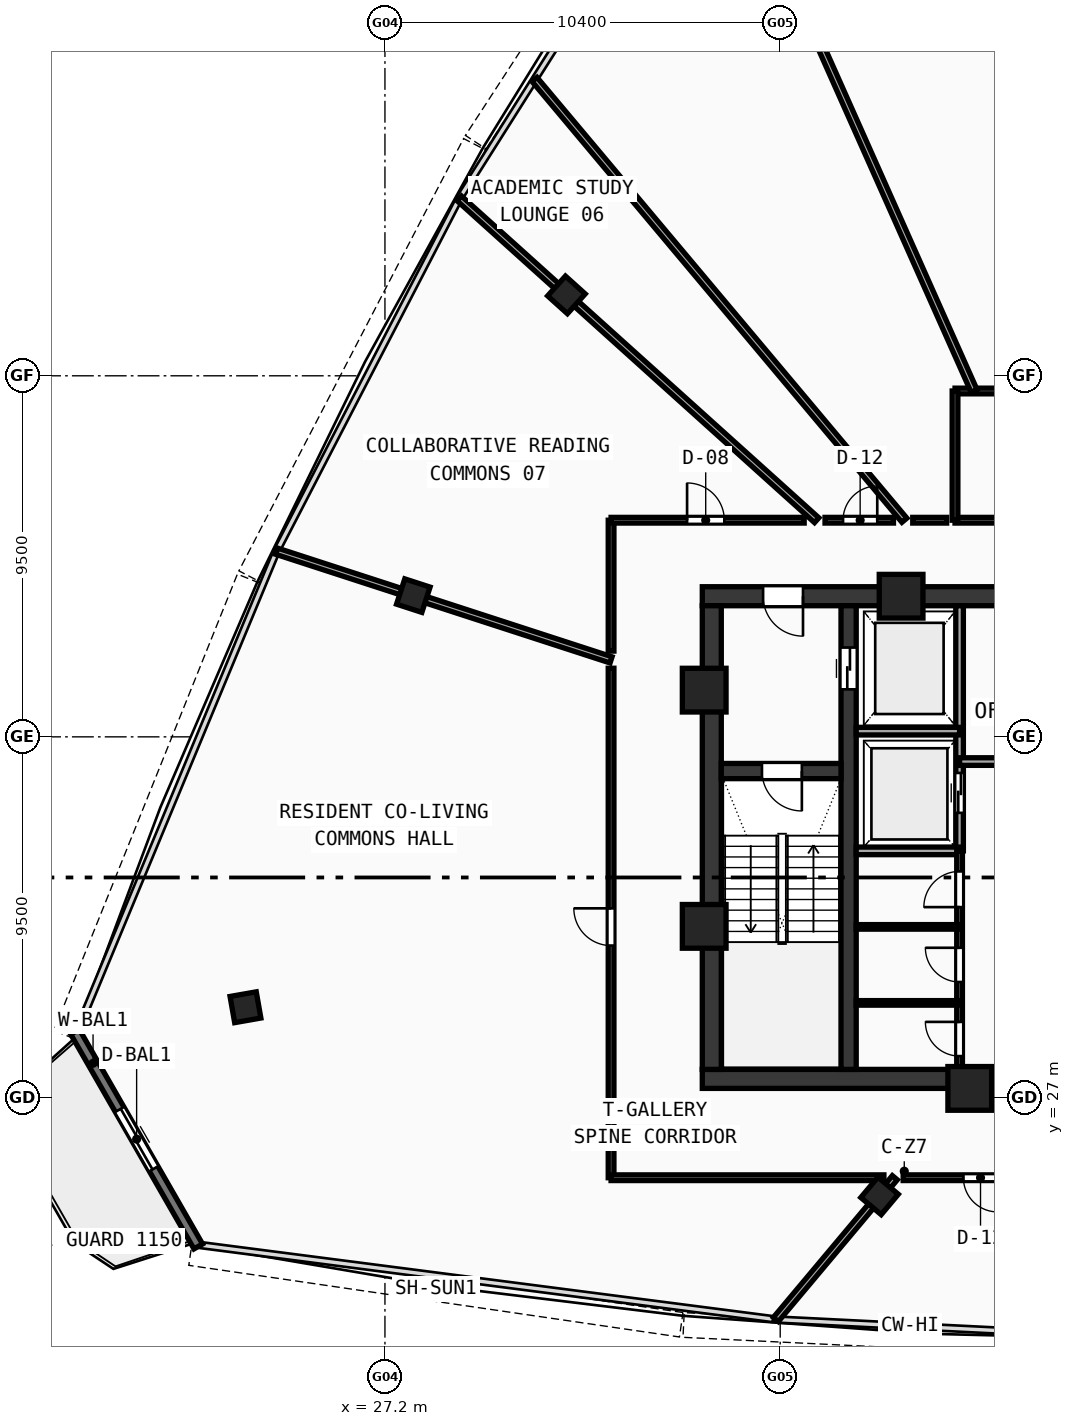
"""IFC4 building model, lengths in metres.
Left out: names, types, materials, properties, quantities, classifications, styles, units other than length and angle.
Written with IfcOpenShell. Run it as: python <this file> out.ifc"""

import sys

from ifc_helpers import new_model, si_unit, direction, frame, frame_2d, origin, origin_with_axes, origin_2d, place, context, subcontext, project, spatial, rectangle, hollow_rectangle, extrude, source, transform, mapped, element, fill, save


model = new_model("IFC4")
c1 = context("Model", 3, precision=1e-05, world=origin(), true_north=direction((0.0, 1.0)))
c2 = subcontext(c1, "Body", "Model", "MODEL_VIEW")
j1 = project(units=[si_unit("LENGTHUNIT", "METRE"), si_unit("PLANEANGLEUNIT", "RADIAN")], contexts=[c1])
p1 = place(None, origin())
s1 = spatial("IfcSite", under=j1, at=p1, CompositionType="ELEMENT")
p2 = place(p1, origin())
s2 = spatial("IfcBuilding", under=s1, at=p2, CompositionType="ELEMENT")
p3 = place(p2, frame((0.0, 0.0, 325.51)))
s3 = spatial("IfcBuildingStorey", under=s2, at=p3, CompositionType="ELEMENT", Elevation=325.51)
p4 = place(p3, frame((35.55, 27.5, 0.0), z_axis=(0.0, 0.0, 1.0), x_axis=(1.0, 0.0, 0.0)))
e1 = element("IfcWall", 1, at=p4, inside=s3, PredefinedType="SHEAR", context=c2, shape_type="SweptSolid", body=[
    extrude(rectangle(XDim=24.9, YDim=0.5, at=frame_2d((12.45, 0.0))), origin(), (0.0, 0.0, 1.0), 3.49),
])
p5 = place(p3, frame((35.55, 40.2, 0.0), z_axis=(0.0, 0.0, 1.0), x_axis=(1.0, 0.0, 0.0)))
e2 = element("IfcWall", 2, at=p5, inside=s3, PredefinedType="SHEAR", context=c2, shape_type="SweptSolid", body=[
    extrude(rectangle(XDim=11.25, YDim=0.5, at=frame_2d((5.625, 0.0))), origin(), (0.0, 0.0, 1.0), 3.49),
])
p6 = place(p5, frame((1.6, 0.0, 0.0)))
e3 = element("IfcOpeningElement", 3, at=p6, cuts=e2, PredefinedType="OPENING", context=c2, shape_type="SweptSolid", body=[
    extrude(rectangle(XDim=1.05, YDim=2.1, at=frame_2d((0.525, 1.05))), frame((0.0, 0.26, 0.0), z_axis=(0.0, -1.0, 0.0), x_axis=(1.0, 0.0, 0.0)), (0.0, 0.0, 1.0), 0.52),
])
p7 = place(p3, frame((35.8, 27.75, 0.0), z_axis=(0.0, 0.0, 1.0), x_axis=(0.0, 1.0, 0.0)))
e4 = element("IfcWall", 4, at=p7, inside=s3, PredefinedType="SHEAR", context=c2, shape_type="SweptSolid", body=[
    extrude(rectangle(XDim=12.2, YDim=0.5, at=frame_2d((6.1, 0.0))), origin(), (0.0, 0.0, 1.0), 3.49),
])
p8 = place(p3, frame((39.4, 27.75, 0.0), z_axis=(0.0, 0.0, 1.0), x_axis=(0.0, 1.0, 0.0)))
e5 = element("IfcWall", 5, at=p8, inside=s3, PredefinedType="SHEAR", context=c2, shape_type="SweptSolid", body=[
    extrude(rectangle(XDim=12.2, YDim=0.4, at=frame_2d((6.1, 0.0))), origin(), (0.0, 0.0, 1.0), 3.49),
])
p9 = place(p8, frame((10.0, 0.0, 0.0)))
e6 = element("IfcOpeningElement", 6, at=p9, cuts=e5, PredefinedType="OPENING", context=c2, shape_type="SweptSolid", body=[
    extrude(rectangle(XDim=1.1, YDim=2.1, at=frame_2d((0.55, 1.05))), frame((0.0, 0.21, 0.0), z_axis=(0.0, -1.0, 0.0), x_axis=(1.0, 0.0, 0.0)), (0.0, 0.0, 1.0), 0.42),
])
p10 = place(p3, frame((36.05, 35.6, 0.0), z_axis=(0.0, 0.0, 1.0), x_axis=(1.0, 0.0, 0.0)))
e7 = element("IfcWall", 7, at=p10, inside=s3, PredefinedType="SHEAR", context=c2, shape_type="SweptSolid", body=[
    extrude(rectangle(XDim=3.15, YDim=0.4, at=frame_2d((1.575, 0.0))), origin(), (0.0, 0.0, 1.0), 3.49),
])
p11 = place(p10, frame((1.07, 0.0, 0.0)))
e8 = element("IfcOpeningElement", 8, at=p11, cuts=e7, PredefinedType="OPENING", context=c2, shape_type="SweptSolid", body=[
    extrude(rectangle(XDim=1.05, YDim=2.1, at=frame_2d((0.525, 1.05))), frame((0.0, 0.21, 0.0), z_axis=(0.0, -1.0, 0.0), x_axis=(1.0, 0.0, 0.0)), (0.0, 0.0, 1.0), 0.42),
])
m1 = source(origin(), c2, "Body", "SweptSolid", [
    extrude(hollow_rectangle(XDim=1.15, YDim=1.15, WallThickness=0.048, at=origin_2d()), origin(), (0.0, 0.0, 1.0), 3.75),
])
for number, where, z_axis, x_axis in (
    (9, (42.588, 27.25, -0.26), (0.0, 0.0, 1.0), (1.0, 0.0, 0.0)),
    (10, (40.781, 40.2, -0.26), (0.0, 0.0, 1.0), (1.0, 0.0, 0.0)),
    (11, (35.6, 37.729, -0.26), (0.0, 0.0, 1.0), (1.0, 0.0, 0.0)),
    (12, (35.6, 31.513, -0.26), (0.0, 0.0, 1.0), (1.0, 0.0, 0.0)),
):
    element("IfcColumn", number, at=place(p3, frame(where, z_axis=z_axis, x_axis=x_axis)), inside=s3, PredefinedType="COLUMN", context=c2, shape_type="MappedRepresentation", body=[
        mapped(m1, transform((0.0, 0.0, 0.0), scale=1.0)),
    ])
m2 = source(origin(), c2, "Body", "SweptSolid", [
    extrude(hollow_rectangle(XDim=0.7, YDim=0.7, WallThickness=0.026, at=origin_2d()), origin(), (0.0, 0.0, 1.0), 3.75),
])
for number, where, z_axis, x_axis in (
    (13, (40.215, 24.422, -0.26), (0.0, 0.0, 1.0), (0.766, -0.643, 0.0)),
    (14, (31.975, 48.129, -0.26), (0.0, 0.0, 1.0), (-0.669, -0.743, 0.0)),
    (15, (27.947, 40.216, -0.26), (0.0, 0.0, 1.0), (-0.309, -0.951, 0.0)),
    (16, (23.53, 29.385, -0.26), (0.0, 0.0, 1.0), (0.174, -0.985, 0.0)),
):
    element("IfcColumn", number, at=place(p3, frame(where, z_axis=z_axis, x_axis=x_axis)), inside=s3, PredefinedType="COLUMN", context=c2, shape_type="MappedRepresentation", body=[
        mapped(m2, transform((0.0, 0.0, 0.0), scale=1.0)),
    ])
p12 = place(p3, frame((19.045, 28.739, 0.0), z_axis=(0.0, 0.0, 1.0), x_axis=(0.49793434898, -0.867214727796, 0.0)))
e17 = element("IfcWall", 17, at=p12, inside=s3, PredefinedType="STANDARD", context=c2, shape_type="SweptSolid", body=[
    extrude(rectangle(XDim=6.513, YDim=0.26, at=frame_2d((3.256, 0.0))), origin(), (0.0, 0.0, 1.0), 3.49),
])
p13 = place(p12, frame((2.356, 0.0, 0.0)))
e18 = element("IfcOpeningElement", 18, at=p13, cuts=e17, PredefinedType="OPENING", context=c2, shape_type="SweptSolid", body=[
    extrude(rectangle(XDim=1.8, YDim=2.15, at=frame_2d((0.9, 1.075))), frame((0.0, 0.14, 0.0), z_axis=(0.0, -1.0, 0.0), x_axis=(1.0, 0.0, 0.0)), (0.0, 0.0, 1.0), 0.28),
])
p14 = place(p3, frame((42.32, 33.5, 0.0), z_axis=(0.0, 0.0, 1.0), x_axis=(0.0, 1.0, 0.0)))
e19 = element("IfcWall", 19, at=p14, inside=s3, PredefinedType="SOLIDWALL", context=c2, shape_type="SweptSolid", body=[
    extrude(rectangle(XDim=6.45, YDim=0.2, at=frame_2d((3.225, 0.0))), origin(), (0.0, 0.0, 1.0), 3.49),
])
p15 = place(p14, frame((1.0, 0.0, 0.0)))
e20 = element("IfcOpeningElement", 20, at=p15, cuts=e19, PredefinedType="OPENING", context=c2, shape_type="SweptSolid", body=[
    extrude(rectangle(XDim=1.05, YDim=2.1, at=frame_2d((0.525, 1.05))), frame((0.0, 0.11, 0.0), z_axis=(0.0, -1.0, 0.0), x_axis=(1.0, 0.0, 0.0)), (0.0, 0.0, 1.0), 0.22),
])
for number, where, z_axis, x_axis in (
    (21, (39.6, 36.65, 0.0), (0.0, 0.0, 1.0), (1.0, 0.0, 0.0)),
    (22, (39.6, 33.5, 0.0), (0.0, 0.0, 1.0), (1.0, 0.0, 0.0)),
):
    element("IfcWall", number, at=place(p3, frame(where, z_axis=z_axis, x_axis=x_axis)), inside=s3, PredefinedType="SOLIDWALL", context=c2, shape_type="SweptSolid", body=[
        extrude(rectangle(XDim=2.72, YDim=0.2, at=frame_2d((1.36, 0.0))), origin(), (0.0, 0.0, 1.0), 3.49),
    ])
p16 = place(p3, frame((42.32, 35.85, 0.0), z_axis=(0.0, 0.0, 1.0), x_axis=(1.0, 0.0, 0.0)))
e23 = element("IfcWall", 23, at=p16, inside=s3, PredefinedType="SOLIDWALL", context=c2, shape_type="SweptSolid", body=[
    extrude(rectangle(XDim=4.73, YDim=0.2, at=frame_2d((2.365, 0.0))), origin(), (0.0, 0.0, 1.0), 3.49),
])
p17 = place(p16, frame((1.8, 0.0, 0.0)))
e24 = element("IfcOpeningElement", 24, at=p17, cuts=e23, PredefinedType="OPENING", context=c2, shape_type="SweptSolid", body=[
    extrude(rectangle(XDim=0.9, YDim=2.1, at=frame_2d((0.45, 1.05))), frame((0.0, 0.11, 0.0), z_axis=(0.0, -1.0, 0.0), x_axis=(1.0, 0.0, 0.0)), (0.0, 0.0, 1.0), 0.22),
])
p18 = place(p3, frame((42.32, 27.6, 0.0), z_axis=(0.0, 0.0, 1.0), x_axis=(0.0, 1.0, 0.0)))
e25 = element("IfcWall", 25, at=p18, inside=s3, PredefinedType="PARTITIONING", context=c2, shape_type="SweptSolid", body=[
    extrude(rectangle(XDim=5.9, YDim=0.15, at=frame_2d((2.95, 0.0))), origin(), (0.0, 0.0, 1.0), 3.49),
])
p19 = place(p18, frame((0.5, 0.0, 0.0)))
e26 = element("IfcOpeningElement", 26, at=p19, cuts=e25, PredefinedType="OPENING", context=c2, shape_type="SweptSolid", body=[
    extrude(rectangle(XDim=0.9, YDim=2.1, at=frame_2d((0.45, 1.05))), frame((0.0, 0.085, 0.0), z_axis=(0.0, -1.0, 0.0), x_axis=(1.0, 0.0, 0.0)), (0.0, 0.0, 1.0), 0.17),
])
p20 = place(p18, frame((2.45, 0.0, 0.0)))
e27 = element("IfcOpeningElement", 27, at=p20, cuts=e25, PredefinedType="OPENING", context=c2, shape_type="SweptSolid", body=[
    extrude(rectangle(XDim=0.9, YDim=2.1, at=frame_2d((0.45, 1.05))), frame((0.0, 0.085, 0.0), z_axis=(0.0, -1.0, 0.0), x_axis=(1.0, 0.0, 0.0)), (0.0, 0.0, 1.0), 0.17),
])
p21 = place(p18, frame((4.42, 0.0, 0.0)))
e28 = element("IfcOpeningElement", 28, at=p21, cuts=e25, PredefinedType="OPENING", context=c2, shape_type="SweptSolid", body=[
    extrude(rectangle(XDim=0.94, YDim=2.1, at=frame_2d((0.47, 1.05))), frame((0.0, 0.085, 0.0), z_axis=(0.0, -1.0, 0.0), x_axis=(1.0, 0.0, 0.0)), (0.0, 0.0, 1.0), 0.17),
])
for number, where, z_axis, x_axis in (
    (29, (39.6, 29.5, 0.0), (0.0, 0.0, 1.0), (1.0, 0.0, 0.0)),
    (30, (39.6, 31.5, 0.0), (0.0, 0.0, 1.0), (1.0, 0.0, 0.0)),
):
    element("IfcWall", number, at=place(p3, frame(where, z_axis=z_axis, x_axis=x_axis)), inside=s3, PredefinedType="PARTITIONING", context=c2, shape_type="SweptSolid", body=[
        extrude(rectangle(XDim=2.72, YDim=0.12, at=frame_2d((1.36, 0.0))), origin(), (0.0, 0.0, 1.0), 3.49),
    ])
p22 = place(p3, frame((42.2, 42.2, 0.0), z_axis=(0.0, 0.0, 1.0), x_axis=(1.0, 0.0, 0.0)))
e31 = element("IfcWall", 31, at=p22, inside=s3, PredefinedType="PARTITIONING", context=c2, shape_type="SweptSolid", body=[
    extrude(rectangle(XDim=4.9, YDim=0.15, at=frame_2d((2.45, 0.0))), origin(), (0.0, 0.0, 1.0), 2.89),
])
p23 = place(p22, frame((1.4, 0.0, 0.0)))
e32 = element("IfcOpeningElement", 32, at=p23, cuts=e31, PredefinedType="OPENING", context=c2, shape_type="SweptSolid", body=[
    extrude(rectangle(XDim=0.92, YDim=2.1, at=frame_2d((0.46, 1.05))), frame((0.0, 0.085, 0.0), z_axis=(0.0, -1.0, 0.0), x_axis=(1.0, 0.0, 0.0)), (0.0, 0.0, 1.0), 0.17),
])
p24 = place(p3, frame((42.2, 45.6, 0.0), z_axis=(0.0, 0.0, 1.0), x_axis=(1.0, 0.0, 0.0)))
e33 = element("IfcWall", 33, at=p24, inside=s3, PredefinedType="PARTITIONING", context=c2, shape_type="SweptSolid", body=[
    extrude(rectangle(XDim=4.9, YDim=0.15, at=frame_2d((2.45, 0.0))), origin(), (0.0, 0.0, 1.0), 2.89),
])
p25 = place(p3, frame((42.2, 42.2, 0.0), z_axis=(0.0, 0.0, 1.0), x_axis=(0.0, 1.0, 0.0)))
e34 = element("IfcWall", 34, at=p25, inside=s3, PredefinedType="PARTITIONING", context=c2, shape_type="SweptSolid", body=[
    extrude(rectangle(XDim=3.4, YDim=0.15, at=frame_2d((1.7, 0.0))), origin(), (0.0, 0.0, 1.0), 3.49),
])
p26 = place(p3, frame((42.702, 45.6, 0.0), z_axis=(0.0, 0.0, 1.0), x_axis=(-0.406746839759, 0.913540917719, 0.0)))
e35 = element("IfcWall", 35, at=p26, inside=s3, PredefinedType="PARTITIONING", context=c2, shape_type="SweptSolid", body=[
    extrude(rectangle(XDim=17.013, YDim=0.17, at=frame_2d((8.507, 0.0))), origin(), (0.0, 0.0, 1.0), 2.89),
])
p27 = place(p3, frame((40.868, 42.2, 0.0), z_axis=(0.0, 0.0, 1.0), x_axis=(-0.642782037032, 0.766049119096, 0.0)))
e36 = element("IfcWall", 36, at=p27, inside=s3, PredefinedType="PARTITIONING", context=c2, shape_type="SweptSolid", body=[
    extrude(rectangle(XDim=15.14, YDim=0.17, at=frame_2d((7.57, 0.0))), origin(), (0.0, 0.0, 1.0), 2.89),
])
p28 = place(p3, frame((38.56, 42.2, 0.0), z_axis=(0.0, 0.0, 1.0), x_axis=(-0.743143506998, 0.669132070675, 0.0)))
e37 = element("IfcWall", 37, at=p28, inside=s3, PredefinedType="PARTITIONING", context=c2, shape_type="SweptSolid", body=[
    extrude(rectangle(XDim=12.654, YDim=0.17, at=frame_2d((6.327, 0.0))), origin(), (0.0, 0.0, 1.0), 2.89),
])
p29 = place(p3, frame((33.15, 38.525, 0.0), z_axis=(0.0, 0.0, 1.0), x_axis=(-0.951054035025, 0.309024630836, 0.0)))
e38 = element("IfcWall", 38, at=p29, inside=s3, PredefinedType="PARTITIONING", context=c2, shape_type="SweptSolid", body=[
    extrude(rectangle(XDim=9.254, YDim=0.17, at=frame_2d((4.627, 0.0))), origin(), (0.0, 0.0, 1.0), 2.89),
])
p30 = place(p3, frame((40.616, 24.9, 0.0), z_axis=(0.0, 0.0, 1.0), x_axis=(-0.642804014728, -0.766030677355, 0.0)))
e39 = element("IfcWall", 39, at=p30, inside=s3, PredefinedType="PARTITIONING", context=c2, shape_type="SweptSolid", body=[
    extrude(rectangle(XDim=4.87, YDim=0.17, at=frame_2d((2.435, 0.0))), origin(), (0.0, 0.0, 1.0), 2.89),
])
p31 = place(p3, frame((33.15, 24.9, 0.0), z_axis=(0.0, 0.0, 1.0), x_axis=(0.0, 1.0, 0.0)))
e40 = element("IfcWall", 40, at=p31, inside=s3, PredefinedType="PARTITIONING", context=c2, shape_type="SweptSolid", body=[
    extrude(rectangle(XDim=13.406, YDim=0.15, at=frame_2d((6.703, 0.0))), origin(), (0.0, 0.0, 1.0), 2.89),
])
p32 = place(p31, frame((6.108, 0.0, 0.0)))
e41 = element("IfcOpeningElement", 41, at=p32, cuts=e40, PredefinedType="OPENING", context=c2, shape_type="SweptSolid", body=[
    extrude(rectangle(XDim=0.98, YDim=2.12, at=frame_2d((0.49, 1.06))), frame((0.0, 0.085, 0.0), z_axis=(0.0, -1.0, 0.0), x_axis=(1.0, 0.0, 0.0)), (0.0, 0.0, 1.0), 0.17),
])
p33 = place(p3, frame((33.15, 38.756, 0.0), z_axis=(0.0, 0.0, 1.0), x_axis=(0.0, 1.0, 0.0)))
e42 = element("IfcWall", 42, at=p33, inside=s3, PredefinedType="PARTITIONING", context=c2, shape_type="SweptSolid", body=[
    extrude(rectangle(XDim=3.444, YDim=0.15, at=frame_2d((1.722, 0.0))), origin(), (0.0, 0.0, 1.0), 3.14),
])
p34 = place(p3, frame((33.15, 42.2, 0.0), z_axis=(0.0, 0.0, 1.0), x_axis=(1.0, 0.0, 0.0)))
e43 = element("IfcWall", 43, at=p34, inside=s3, PredefinedType="PARTITIONING", context=c2, shape_type="SweptSolid", body=[
    extrude(rectangle(XDim=5.081, YDim=0.15, at=frame_2d((2.541, 0.0))), origin(), (0.0, 0.0, 1.0), 3.14),
])
p35 = place(p34, frame((2.0, 0.0, 0.0)))
e44 = element("IfcOpeningElement", 44, at=p35, cuts=e43, PredefinedType="OPENING", context=c2, shape_type="SweptSolid", body=[
    extrude(rectangle(XDim=0.98, YDim=2.12, at=frame_2d((0.49, 1.06))), frame((0.0, 0.085, 0.0), z_axis=(0.0, -1.0, 0.0), x_axis=(1.0, 0.0, 0.0)), (0.0, 0.0, 1.0), 0.17),
])
p36 = place(p3, frame((38.78, 42.2, 0.0), z_axis=(0.0, 0.0, 1.0), x_axis=(1.0, 0.0, 0.0)))
e45 = element("IfcWall", 45, at=p36, inside=s3, PredefinedType="PARTITIONING", context=c2, shape_type="SweptSolid", body=[
    extrude(rectangle(XDim=1.801, YDim=0.15, at=frame_2d((0.9, 0.0))), origin(), (0.0, 0.0, 1.0), 2.89),
])
p37 = place(p36, frame((0.474, 0.0, 0.0)))
e46 = element("IfcOpeningElement", 46, at=p37, cuts=e45, PredefinedType="OPENING", context=c2, shape_type="SweptSolid", body=[
    extrude(rectangle(XDim=0.9, YDim=2.08, at=frame_2d((0.45, 1.04))), frame((0.0, 0.085, 0.0), z_axis=(0.0, -1.0, 0.0), x_axis=(1.0, 0.0, 0.0)), (0.0, 0.0, 1.0), 0.17),
])
p38 = place(p3, frame((41.088, 42.2, 0.0), z_axis=(0.0, 0.0, 1.0), x_axis=(1.0, 0.0, 0.0)))
e47 = element("IfcWall", 47, at=p38, inside=s3, PredefinedType="PARTITIONING", context=c2, shape_type="SweptSolid", body=[
    extrude(rectangle(XDim=0.892, YDim=0.15, at=frame_2d((0.446, 0.0))), origin(), (0.0, 0.0, 1.0), 3.49),
])
p39 = place(p3, frame((45.414, 24.9, 0.0), z_axis=(0.0, 0.0, 1.0), x_axis=(-1.0, 0.0, 0.0)))
e48 = element("IfcWall", 48, at=p39, inside=s3, PredefinedType="PARTITIONING", context=c2, shape_type="SweptSolid", body=[
    extrude(rectangle(XDim=4.579, YDim=0.15, at=frame_2d((2.289, 0.0))), origin(), (0.0, 0.0, 1.0), 3.49),
])
p40 = place(p39, frame((2.093, 0.0, 0.0)))
e49 = element("IfcOpeningElement", 49, at=p40, cuts=e48, PredefinedType="OPENING", context=c2, shape_type="SweptSolid", body=[
    extrude(rectangle(XDim=0.9, YDim=2.08, at=frame_2d((0.45, 1.04))), frame((0.0, 0.085, 0.0), z_axis=(0.0, -1.0, 0.0), x_axis=(1.0, 0.0, 0.0)), (0.0, 0.0, 1.0), 0.17),
])
p41 = place(p3, frame((40.329, 24.9, 0.0), z_axis=(0.0, 0.0, 1.0), x_axis=(-1.0, 0.0, 0.0)))
e50 = element("IfcWall", 50, at=p41, inside=s3, PredefinedType="PARTITIONING", context=c2, shape_type="SweptSolid", body=[
    extrude(rectangle(XDim=7.179, YDim=0.15, at=frame_2d((3.589, 0.0))), origin(), (0.0, 0.0, 1.0), 2.89),
])
m3 = source(origin(), c2, "Body", "SweptSolid", [
    extrude(rectangle(XDim=1.8, YDim=2.15, at=frame_2d((0.9, 1.075))), frame((0.0, 0.025, 0.0), z_axis=(0.0, -1.0, 0.0), x_axis=(1.0, 0.0, 0.0)), (0.0, 0.0, 1.0), 0.05),
])
p42 = place(p13, origin_with_axes())
e51 = element("IfcDoor", 51, at=p42, inside=s3, OperationType="DOUBLE_DOOR_SLIDING", PredefinedType="DOOR", context=c2, shape_type="MappedRepresentation", body=[
    mapped(m3, transform((0.0, 0.0, 0.0), scale=1.0)),
])
fill(e18, e51)
m4 = source(origin(), c2, "Body", "SweptSolid", [
    extrude(rectangle(XDim=1.05, YDim=2.1, at=frame_2d((0.525, 1.05))), frame((0.0, 0.025, 0.0), z_axis=(0.0, -1.0, 0.0), x_axis=(1.0, 0.0, 0.0)), (0.0, 0.0, 1.0), 0.05),
])
p43 = place(p11, frame((1.05, 0.0, 0.0), z_axis=(0.0, 0.0, 1.0), x_axis=(-1.0, 0.0, 0.0)))
e52 = element("IfcDoor", 52, at=p43, inside=s3, OperationType="SINGLE_SWING_LEFT", PredefinedType="DOOR", context=c2, shape_type="MappedRepresentation", body=[
    mapped(m4, transform((0.0, 0.0, 0.0), scale=1.0)),
])
fill(e8, e52)
p44 = place(p6, frame((1.05, 0.0, 0.0), z_axis=(0.0, 0.0, 1.0), x_axis=(-1.0, 0.0, 0.0)))
e53 = element("IfcDoor", 53, at=p44, inside=s3, OperationType="SINGLE_SWING_LEFT", PredefinedType="DOOR", context=c2, shape_type="MappedRepresentation", body=[
    mapped(m4, transform((0.0, 0.0, 0.0), scale=1.0)),
])
fill(e3, e53)
m5 = source(origin(), c2, "Body", "SweptSolid", [
    extrude(rectangle(XDim=1.1, YDim=2.1, at=frame_2d((0.55, 1.05))), frame((0.0, 0.025, 0.0), z_axis=(0.0, -1.0, 0.0), x_axis=(1.0, 0.0, 0.0)), (0.0, 0.0, 1.0), 0.05),
])
p45 = place(p9, frame((1.1, 0.0, 0.0), z_axis=(0.0, 0.0, 1.0), x_axis=(-1.0, 0.0, 0.0)))
e54 = element("IfcDoor", 54, at=p45, inside=s3, OperationType="DOUBLE_DOOR_SLIDING", PredefinedType="DOOR", context=c2, shape_type="MappedRepresentation", body=[
    mapped(m5, transform((0.0, 0.0, 0.0), scale=1.0)),
])
fill(e6, e54)
p46 = place(p15, origin_with_axes())
e55 = element("IfcDoor", 55, at=p46, inside=s3, OperationType="DOUBLE_DOOR_SLIDING", PredefinedType="DOOR", context=c2, shape_type="MappedRepresentation", body=[
    mapped(m4, transform((0.0, 0.0, 0.0), scale=1.0)),
])
fill(e20, e55)
m6 = source(origin(), c2, "Body", "SweptSolid", [
    extrude(rectangle(XDim=0.9, YDim=2.1, at=frame_2d((0.45, 1.05))), frame((0.0, 0.025, 0.0), z_axis=(0.0, -1.0, 0.0), x_axis=(1.0, 0.0, 0.0)), (0.0, 0.0, 1.0), 0.05),
])
p47 = place(p19, origin_with_axes())
e56 = element("IfcDoor", 56, at=p47, inside=s3, OperationType="SINGLE_SWING_RIGHT", PredefinedType="DOOR", context=c2, shape_type="MappedRepresentation", body=[
    mapped(m6, transform((0.0, 0.0, 0.0), scale=1.0)),
])
fill(e26, e56)
p48 = place(p20, origin_with_axes())
e57 = element("IfcDoor", 57, at=p48, inside=s3, OperationType="SINGLE_SWING_RIGHT", PredefinedType="DOOR", context=c2, shape_type="MappedRepresentation", body=[
    mapped(m6, transform((0.0, 0.0, 0.0), scale=1.0)),
])
fill(e27, e57)
m7 = source(origin(), c2, "Body", "SweptSolid", [
    extrude(rectangle(XDim=0.94, YDim=2.1, at=frame_2d((0.47, 1.05))), frame((0.0, 0.025, 0.0), z_axis=(0.0, -1.0, 0.0), x_axis=(1.0, 0.0, 0.0)), (0.0, 0.0, 1.0), 0.05),
])
p49 = place(p21, origin_with_axes())
e58 = element("IfcDoor", 58, at=p49, inside=s3, OperationType="SINGLE_SWING_LEFT", PredefinedType="DOOR", context=c2, shape_type="MappedRepresentation", body=[
    mapped(m7, transform((0.0, 0.0, 0.0), scale=1.0)),
])
fill(e28, e58)
m8 = source(origin(), c2, "Body", "SweptSolid", [
    extrude(rectangle(XDim=0.9, YDim=2.08, at=frame_2d((0.45, 1.04))), frame((0.0, 0.025, 0.0), z_axis=(0.0, -1.0, 0.0), x_axis=(1.0, 0.0, 0.0)), (0.0, 0.0, 1.0), 0.05),
])
p50 = place(p37, origin_with_axes())
e59 = element("IfcDoor", 59, at=p50, inside=s3, OperationType="SINGLE_SWING_RIGHT", PredefinedType="DOOR", context=c2, shape_type="MappedRepresentation", body=[
    mapped(m8, transform((0.0, 0.0, 0.0), scale=1.0)),
])
fill(e46, e59)
m9 = source(origin(), c2, "Body", "SweptSolid", [
    extrude(rectangle(XDim=0.98, YDim=2.12, at=frame_2d((0.49, 1.06))), frame((0.0, 0.025, 0.0), z_axis=(0.0, -1.0, 0.0), x_axis=(1.0, 0.0, 0.0)), (0.0, 0.0, 1.0), 0.05),
])
p51 = place(p35, origin_with_axes())
e60 = element("IfcDoor", 60, at=p51, inside=s3, OperationType="SINGLE_SWING_LEFT", PredefinedType="DOOR", context=c2, shape_type="MappedRepresentation", body=[
    mapped(m9, transform((0.0, 0.0, 0.0), scale=1.0)),
])
fill(e44, e60)
p52 = place(p32, origin_with_axes())
e61 = element("IfcDoor", 61, at=p52, inside=s3, OperationType="SINGLE_SWING_RIGHT", PredefinedType="DOOR", context=c2, shape_type="MappedRepresentation", body=[
    mapped(m9, transform((0.0, 0.0, 0.0), scale=1.0)),
])
fill(e41, e61)
p53 = place(p40, origin_with_axes())
e62 = element("IfcDoor", 62, at=p53, inside=s3, OperationType="SINGLE_SWING_LEFT", PredefinedType="DOOR", context=c2, shape_type="MappedRepresentation", body=[
    mapped(m8, transform((0.0, 0.0, 0.0), scale=1.0)),
])
fill(e49, e62)
save(model, sys.argv[1])
